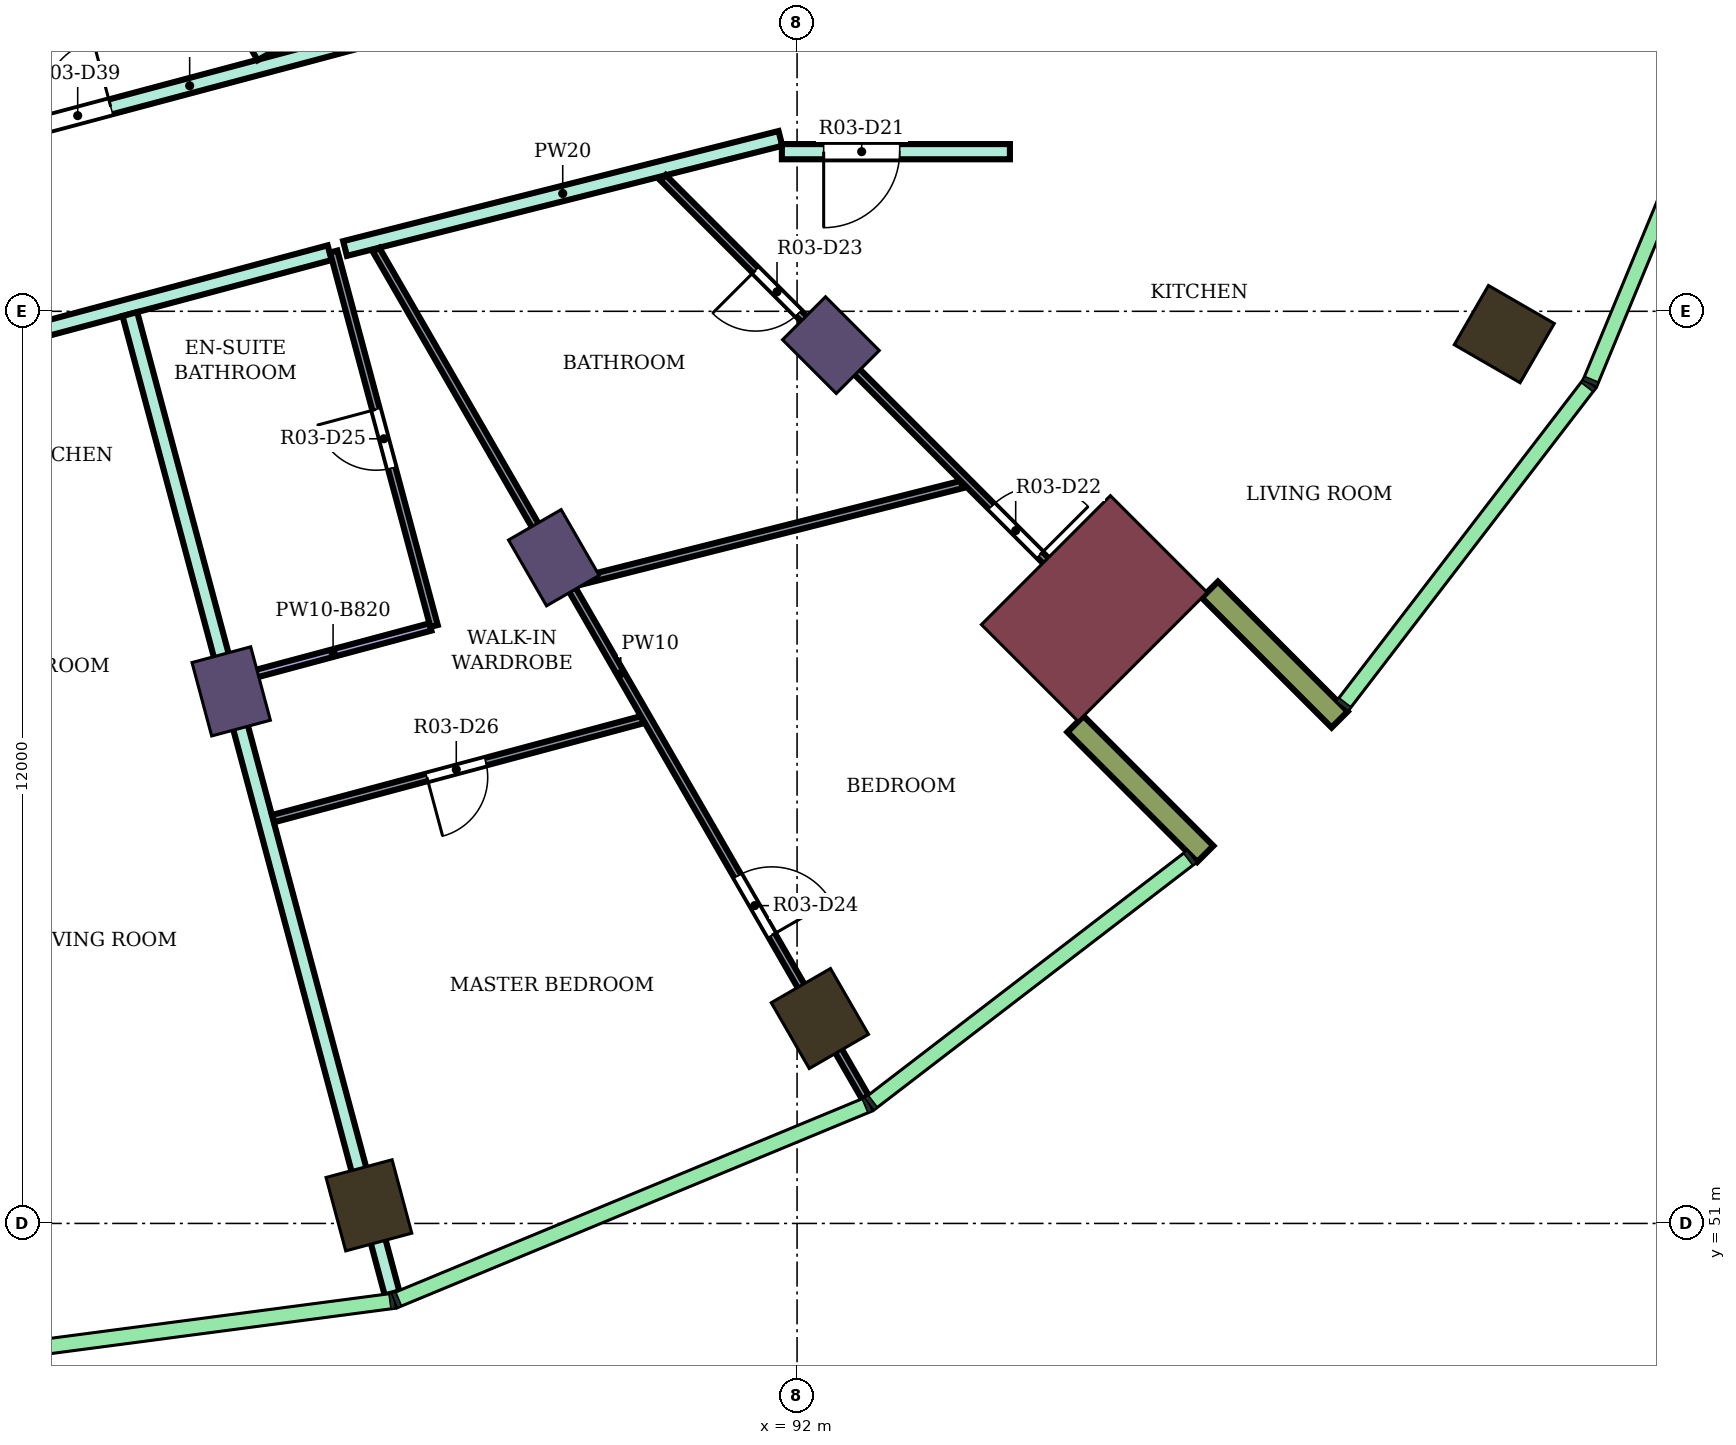
"""IFC4 building model, lengths in metres.
Left out: names, types, materials, properties, quantities, classifications, styles, units other than length and angle.
Written with IfcOpenShell. Run it as: python <this file> out.ifc"""

import sys

from ifc_helpers import new_model, si_unit, direction, frame, frame_2d, origin, origin_2d, place, context, subcontext, project, spatial, rectangle, extrude, element, fill, save


model = new_model("IFC4")
c1 = context("Model", 3, precision=1e-05, world=origin(), true_north=direction((0.0, 1.0)))
c2 = subcontext(c1, "Body", "Model", "MODEL_VIEW")
j1 = project(units=[si_unit("LENGTHUNIT", "METRE"), si_unit("PLANEANGLEUNIT", "RADIAN")], contexts=[c1])
p1 = place(None, origin())
s1 = spatial("IfcSite", under=j1, at=p1, CompositionType="ELEMENT")
p2 = place(p1, origin())
s2 = spatial("IfcBuilding", under=s1, at=p2, CompositionType="ELEMENT")
p3 = place(p2, frame((0.0, 0.0, 190.5)))
s3 = spatial("IfcBuildingStorey", under=s2, at=p3, CompositionType="ELEMENT", Elevation=190.5)
for number, where, z_axis, x_axis in (
    (1, (86.367, 51.238, 0.0), (0.0, 0.0, 1.0), (0.259, -0.966, 0.0)),
    (2, (92.3, 53.696, 0.0), (0.0, 0.0, 1.0), (0.5, -0.866, 0.0)),
    (3, (101.304, 62.7, 0.0), (0.0, 0.0, 1.0), (0.866, -0.5, 0.0)),
):
    element("IfcColumn", number, at=place(p3, frame(where, z_axis=z_axis, x_axis=x_axis)), inside=s3, PredefinedType="COLUMN", context=c2, shape_type="SweptSolid", body=[
        extrude(rectangle(XDim=1.0, YDim=0.9, at=origin_2d()), origin(), (0.0, 0.0, 1.0), 4.1),
    ])
for number, where, z_axis, x_axis in (
    (4, (84.555, 58.0, 0.0), (0.0, 0.0, 1.0), (0.259, -0.966, 0.0)),
    (5, (88.8, 59.758, 0.0), (0.0, 0.0, 1.0), (0.5, -0.866, 0.0)),
    (6, (92.445, 62.555, 0.0), (0.0, 0.0, 1.0), (0.707, -0.707, 0.0)),
):
    element("IfcColumn", number, at=place(p3, frame(where, z_axis=z_axis, x_axis=x_axis)), inside=s3, PredefinedType="COLUMN", context=c2, shape_type="SweptSolid", body=[
        extrude(rectangle(XDim=1.0, YDim=0.8, at=origin_2d()), origin(), (0.0, 0.0, 1.0), 4.1),
    ])
p4 = place(p3, frame((95.91, 59.09, 0.0), z_axis=(0.0, 0.0, 1.0), x_axis=(0.707106781187, -0.707106781187, 0.0)))
e7 = element("IfcColumn", 7, at=p4, inside=s3, PredefinedType="COLUMN", context=c2, shape_type="SweptSolid", body=[
    extrude(rectangle(XDim=1.8, YDim=2.4, at=origin_2d()), origin(), (0.0, 0.0, 1.0), 4.1),
])
for number, where, z_axis, x_axis in (
    (8, (95.662, 57.57, 0.0), (0.0, 0.0, 1.0), (0.707, -0.707, 0.0)),
    (9, (97.43, 59.338, 0.0), (0.0, 0.0, 1.0), (0.707, -0.707, 0.0)),
):
    element("IfcWall", number, at=place(p3, frame(where, z_axis=z_axis, x_axis=x_axis)), inside=s3, PredefinedType="NOTDEFINED", context=c2, shape_type="SweptSolid", body=[
        extrude(rectangle(XDim=2.416, YDim=0.3, at=frame_2d((1.208, 0.0))), origin(), (0.0, 0.0, 1.0), 4.1),
    ])
p5 = place(p3, frame((80.125, 64.932, 0.0), z_axis=(0.0, 0.0, 1.0), x_axis=(0.966236955806, 0.257655089674, 0.0)))
e10 = element("IfcWall", 10, at=p5, inside=s3, PredefinedType="PARTITIONING", context=c2, shape_type="SweptSolid", body=[
    extrude(rectangle(XDim=8.039, YDim=0.2, at=frame_2d((4.02, 0.0))), origin(), (0.0, 0.0, 1.0), 3.65),
])
p6 = place(p5, frame((6.298, 0.0, 0.0)))
e11 = element("IfcOpeningElement", 11, at=p6, cuts=e10, PredefinedType="OPENING", context=c2, shape_type="SweptSolid", body=[
    extrude(rectangle(XDim=0.9, YDim=2.1, at=frame_2d((0.45, 1.05))), frame((0.0, 0.11, 0.0), z_axis=(0.0, -1.0, 0.0), x_axis=(1.0, 0.0, 0.0)), (0.0, 0.0, 1.0), 0.22),
])
p7 = place(p5, frame((2.045, 0.0, 0.0)))
e12 = element("IfcOpeningElement", 12, at=p7, cuts=e10, PredefinedType="OPENING", context=c2, shape_type="SweptSolid", body=[
    extrude(rectangle(XDim=0.9, YDim=2.1, at=frame_2d((0.45, 1.05))), frame((0.0, 0.11, 0.0), z_axis=(0.0, -1.0, 0.0), x_axis=(1.0, 0.0, 0.0)), (0.0, 0.0, 1.0), 0.22),
])
p8 = place(p3, frame((80.048, 62.217, 0.0), z_axis=(0.0, 0.0, 1.0), x_axis=(0.965967276872, 0.258664299841, 0.0)))
e13 = element("IfcWall", 13, at=p8, inside=s3, PredefinedType="PARTITIONING", context=c2, shape_type="SweptSolid", body=[
    extrude(rectangle(XDim=6.007, YDim=0.2, at=frame_2d((3.003, 0.0))), origin(), (0.0, 0.0, 1.0), 3.65),
])
p9 = place(p8, frame((0.066, 0.0, 0.0)))
e14 = element("IfcOpeningElement", 14, at=p9, cuts=e13, PredefinedType="OPENING", context=c2, shape_type="SweptSolid", body=[
    extrude(rectangle(XDim=1.0, YDim=2.1, at=frame_2d((0.5, 1.05))), frame((0.0, 0.11, 0.0), z_axis=(0.0, -1.0, 0.0), x_axis=(1.0, 0.0, 0.0)), (0.0, 0.0, 1.0), 0.22),
])
p10 = place(p3, frame((83.222, 62.964, 0.0), z_axis=(0.0, 0.0, 1.0), x_axis=(0.25865252128, -0.965970430829, 0.0)))
e15 = element("IfcWall", 15, at=p10, inside=s3, PredefinedType="PARTITIONING", context=c2, shape_type="SweptSolid", body=[
    extrude(rectangle(XDim=13.338, YDim=0.2, at=frame_2d((6.669, 0.0))), origin(), (0.0, 0.0, 1.0), 3.65),
])
p11 = place(p3, frame((83.847, 68.332, 0.0), z_axis=(0.0, 0.0, 1.0), x_axis=(0.499953638813, -0.866052168773, 0.0)))
e16 = element("IfcWall", 16, at=p11, inside=s3, PredefinedType="PARTITIONING", context=c2, shape_type="SweptSolid", body=[
    extrude(rectangle(XDim=2.285, YDim=0.2, at=frame_2d((1.143, 0.0))), origin(), (0.0, 0.0, 1.0), 3.65),
])
p12 = place(p3, frame((86.053, 63.826, 0.0), z_axis=(0.0, 0.0, 1.0), x_axis=(0.969490004987, 0.245130843083, 0.0)))
e17 = element("IfcWall", 17, at=p12, inside=s3, PredefinedType="PARTITIONING", context=c2, shape_type="SweptSolid", body=[
    extrude(rectangle(XDim=5.908, YDim=0.2, at=frame_2d((2.954, 0.0))), origin(), (0.0, 0.0, 1.0), 3.65),
])
p13 = place(p3, frame((91.8, 65.1, 0.0), z_axis=(0.0, 0.0, 1.0), x_axis=(1.0, 0.0, 0.0)))
e18 = element("IfcWall", 18, at=p13, inside=s3, PredefinedType="PARTITIONING", context=c2, shape_type="SweptSolid", body=[
    extrude(rectangle(XDim=3.0, YDim=0.2, at=frame_2d((1.5, 0.0))), origin(), (0.0, 0.0, 1.0), 3.65),
])
p14 = place(p13, frame((0.55, 0.0, 0.0)))
e19 = element("IfcOpeningElement", 19, at=p14, cuts=e18, PredefinedType="OPENING", context=c2, shape_type="SweptSolid", body=[
    extrude(rectangle(XDim=1.0, YDim=2.1, at=frame_2d((0.5, 1.05))), frame((0.0, 0.11, 0.0), z_axis=(0.0, -1.0, 0.0), x_axis=(1.0, 0.0, 0.0)), (0.0, 0.0, 1.0), 0.22),
])
p15 = place(p3, frame((84.615, 58.161, 0.0), z_axis=(0.0, 0.0, 1.0), x_axis=(0.965902408875, 0.258906424273, 0.0)))
e20 = element("IfcWall", 20, at=p15, inside=s3, PredefinedType="PARTITIONING", context=c2, shape_type="SweptSolid", body=[
    extrude(rectangle(XDim=2.651, YDim=0.1, at=frame_2d((1.325, 0.0))), origin(), (0.0, 0.0, 1.0), 3.28),
])
p16 = place(p3, frame((85.108, 56.326, 0.0), z_axis=(0.0, 0.0, 1.0), x_axis=(0.965919870225, 0.258841272413, 0.0)))
e21 = element("IfcWall", 21, at=p16, inside=s3, PredefinedType="PARTITIONING", context=c2, shape_type="SweptSolid", body=[
    extrude(rectangle(XDim=5.027, YDim=0.1, at=frame_2d((2.514, 0.0))), origin(), (0.0, 0.0, 1.0), 3.65),
])
p17 = place(p16, frame((2.094, 0.0, 0.0)))
e22 = element("IfcOpeningElement", 22, at=p17, cuts=e21, PredefinedType="OPENING", context=c2, shape_type="SweptSolid", body=[
    extrude(rectangle(XDim=0.8, YDim=2.1, at=frame_2d((0.4, 1.05))), frame((0.0, 0.06, 0.0), z_axis=(0.0, -1.0, 0.0), x_axis=(1.0, 0.0, 0.0)), (0.0, 0.0, 1.0), 0.12),
])
p18 = place(p3, frame((85.904, 63.786, 0.0), z_axis=(0.0, 0.0, 1.0), x_axis=(0.258857329124, -0.965915567303, 0.0)))
e23 = element("IfcWall", 23, at=p18, inside=s3, PredefinedType="PARTITIONING", context=c2, shape_type="SweptSolid", body=[
    extrude(rectangle(XDim=5.1, YDim=0.1, at=frame_2d((2.55, 0.0))), origin(), (0.0, 0.0, 1.0), 3.65),
])
p19 = place(p18, frame((2.15, 0.0, 0.0)))
e24 = element("IfcOpeningElement", 24, at=p19, cuts=e23, PredefinedType="OPENING", context=c2, shape_type="SweptSolid", body=[
    extrude(rectangle(XDim=0.8, YDim=2.1, at=frame_2d((0.4, 1.05))), frame((0.0, 0.06, 0.0), z_axis=(0.0, -1.0, 0.0), x_axis=(1.0, 0.0, 0.0)), (0.0, 0.0, 1.0), 0.12),
])
p20 = place(p3, frame((86.461, 63.81, 0.0), z_axis=(0.0, 0.0, 1.0), x_axis=(0.499911751641, -0.866076348004, 0.0)))
e25 = element("IfcWall", 25, at=p20, inside=s3, PredefinedType="PARTITIONING", context=c2, shape_type="SweptSolid", body=[
    extrude(rectangle(XDim=12.876, YDim=0.1, at=frame_2d((6.438, 0.0))), origin(), (0.0, 0.0, 1.0), 3.65),
])
p21 = place(p20, frame((9.514, 0.0, 0.0)))
e26 = element("IfcOpeningElement", 26, at=p21, cuts=e25, PredefinedType="OPENING", context=c2, shape_type="SweptSolid", body=[
    extrude(rectangle(XDim=0.9, YDim=2.1, at=frame_2d((0.45, 1.05))), frame((0.0, 0.06, 0.0), z_axis=(0.0, -1.0, 0.0), x_axis=(1.0, 0.0, 0.0)), (0.0, 0.0, 1.0), 0.12),
])
p22 = place(p3, frame((89.058, 59.429, 0.0), z_axis=(0.0, 0.0, 1.0), x_axis=(0.96946321375, 0.2452367778, 0.0)))
e27 = element("IfcWall", 27, at=p22, inside=s3, PredefinedType="PARTITIONING", context=c2, shape_type="SweptSolid", body=[
    extrude(rectangle(XDim=5.272, YDim=0.1, at=frame_2d((2.636, 0.0))), origin(), (0.0, 0.0, 1.0), 3.65),
])
p23 = place(p3, frame((90.236, 64.758, 0.0), z_axis=(0.0, 0.0, 1.0), x_axis=(0.706924769926, -0.707288745609, 0.0)))
e28 = element("IfcWall", 28, at=p23, inside=s3, PredefinedType="PARTITIONING", context=c2, shape_type="SweptSolid", body=[
    extrude(rectangle(XDim=8.72, YDim=0.1, at=frame_2d((4.36, 0.0))), origin(), (0.0, 0.0, 1.0), 3.65),
])
p24 = place(p23, frame((6.114, 0.0, 0.0)))
e29 = element("IfcOpeningElement", 29, at=p24, cuts=e28, PredefinedType="OPENING", context=c2, shape_type="SweptSolid", body=[
    extrude(rectangle(XDim=0.9, YDim=2.1, at=frame_2d((0.45, 1.05))), frame((0.0, 0.06, 0.0), z_axis=(0.0, -1.0, 0.0), x_axis=(1.0, 0.0, 0.0)), (0.0, 0.0, 1.0), 0.12),
])
p25 = place(p23, frame((1.722, 0.0, 0.0)))
e30 = element("IfcOpeningElement", 30, at=p25, cuts=e28, PredefinedType="OPENING", context=c2, shape_type="SweptSolid", body=[
    extrude(rectangle(XDim=0.8, YDim=2.1, at=frame_2d((0.4, 1.05))), frame((0.0, 0.06, 0.0), z_axis=(0.0, -1.0, 0.0), x_axis=(1.0, 0.0, 0.0)), (0.0, 0.0, 1.0), 0.12),
])
p26 = place(p14, frame((1.0, 0.0, 0.0), z_axis=(0.0, 0.0, 1.0), x_axis=(-1.0, 0.0, 0.0)))
e31 = element("IfcDoor", 31, at=p26, inside=s3, OperationType="SINGLE_SWING_RIGHT", PredefinedType="DOOR", context=c2, shape_type="SweptSolid", body=[
    extrude(rectangle(XDim=1.0, YDim=2.1, at=frame_2d((0.5, 1.05))), frame((0.0, 0.025, 0.0), z_axis=(0.0, -1.0, 0.0), x_axis=(1.0, 0.0, 0.0)), (0.0, 0.0, 1.0), 0.05),
])
fill(e19, e31)
p27 = place(p24, origin())
e32 = element("IfcDoor", 32, at=p27, inside=s3, OperationType="SINGLE_SWING_RIGHT", PredefinedType="DOOR", context=c2, shape_type="SweptSolid", body=[
    extrude(rectangle(XDim=0.9, YDim=2.1, at=frame_2d((0.45, 1.05))), frame((0.0, 0.025, 0.0), z_axis=(0.0, -1.0, 0.0), x_axis=(1.0, 0.0, 0.0)), (0.0, 0.0, 1.0), 0.05),
])
fill(e29, e32)
p28 = place(p25, frame((0.8, 0.0, 0.0), z_axis=(0.0, 0.0, 1.0), x_axis=(-1.0, 0.0, 0.0)))
e33 = element("IfcDoor", 33, at=p28, inside=s3, OperationType="SINGLE_SWING_RIGHT", PredefinedType="DOOR", context=c2, shape_type="SweptSolid", body=[
    extrude(rectangle(XDim=0.8, YDim=2.1, at=frame_2d((0.4, 1.05))), frame((0.0, 0.025, 0.0), z_axis=(0.0, -1.0, 0.0), x_axis=(1.0, 0.0, 0.0)), (0.0, 0.0, 1.0), 0.05),
])
fill(e30, e33)
p29 = place(p21, origin())
e34 = element("IfcDoor", 34, at=p29, inside=s3, OperationType="SINGLE_SWING_RIGHT", PredefinedType="DOOR", context=c2, shape_type="SweptSolid", body=[
    extrude(rectangle(XDim=0.9, YDim=2.1, at=frame_2d((0.45, 1.05))), frame((0.0, 0.025, 0.0), z_axis=(0.0, -1.0, 0.0), x_axis=(1.0, 0.0, 0.0)), (0.0, 0.0, 1.0), 0.05),
])
fill(e26, e34)
p30 = place(p19, frame((0.8, 0.0, 0.0), z_axis=(0.0, 0.0, 1.0), x_axis=(-1.0, 0.0, 0.0)))
e35 = element("IfcDoor", 35, at=p30, inside=s3, OperationType="SINGLE_SWING_RIGHT", PredefinedType="DOOR", context=c2, shape_type="SweptSolid", body=[
    extrude(rectangle(XDim=0.8, YDim=2.1, at=frame_2d((0.4, 1.05))), frame((0.0, 0.025, 0.0), z_axis=(0.0, -1.0, 0.0), x_axis=(1.0, 0.0, 0.0)), (0.0, 0.0, 1.0), 0.05),
])
fill(e24, e35)
p31 = place(p17, frame((0.8, 0.0, 0.0), z_axis=(0.0, 0.0, 1.0), x_axis=(-1.0, 0.0, 0.0)))
e36 = element("IfcDoor", 36, at=p31, inside=s3, OperationType="SINGLE_SWING_RIGHT", PredefinedType="DOOR", context=c2, shape_type="SweptSolid", body=[
    extrude(rectangle(XDim=0.8, YDim=2.1, at=frame_2d((0.4, 1.05))), frame((0.0, 0.025, 0.0), z_axis=(0.0, -1.0, 0.0), x_axis=(1.0, 0.0, 0.0)), (0.0, 0.0, 1.0), 0.05),
])
fill(e22, e36)
p32 = place(p7, origin())
e37 = element("IfcDoor", 37, at=p32, inside=s3, OperationType="SINGLE_SWING_RIGHT", PredefinedType="DOOR", context=c2, shape_type="SweptSolid", body=[
    extrude(rectangle(XDim=0.9, YDim=2.1, at=frame_2d((0.45, 1.05))), frame((0.0, 0.025, 0.0), z_axis=(0.0, -1.0, 0.0), x_axis=(1.0, 0.0, 0.0)), (0.0, 0.0, 1.0), 0.05),
])
fill(e12, e37)
save(model, sys.argv[1])
